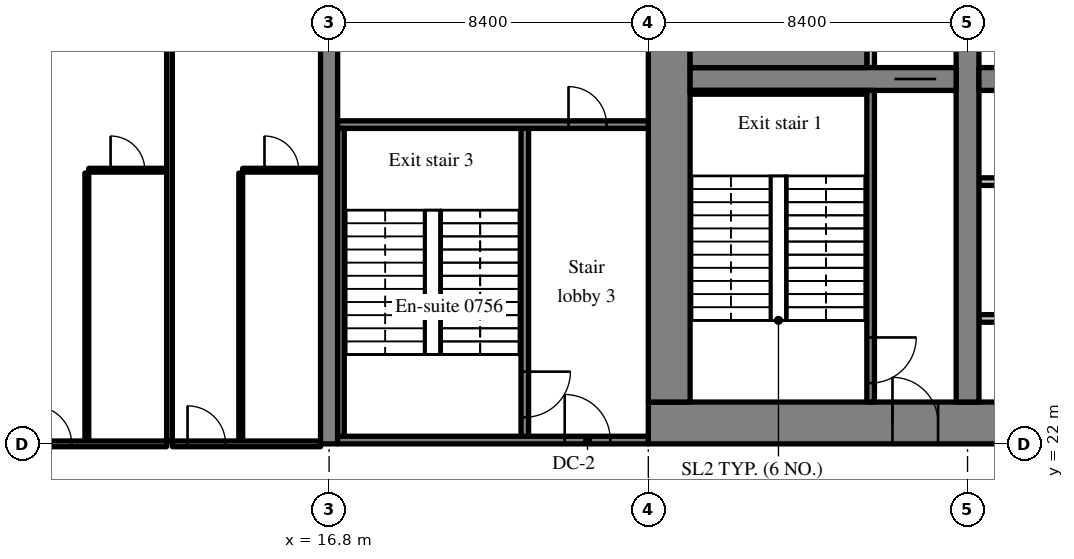
"""IFC4 building model, lengths in metres.
Left out: names, types, materials, properties, quantities, classifications, styles, units other than length and angle.
Written with IfcOpenShell. Run it as: python <this file> out.ifc"""

import sys

from ifc_helpers import new_model, si_unit, direction, frame, frame_2d, origin, place, context, subcontext, project, spatial, rectangle, extrude, source, transform, mapped, element, fill, save


model = new_model("IFC4")
c1 = context("Model", 3, precision=1e-05, world=origin(), true_north=direction((0.0, 1.0)))
c2 = subcontext(c1, "Body", "Model", "MODEL_VIEW")
j1 = project(units=[si_unit("LENGTHUNIT", "METRE"), si_unit("PLANEANGLEUNIT", "RADIAN")], contexts=[c1])
p1 = place(None, origin())
s1 = spatial("IfcSite", under=j1, at=p1, CompositionType="ELEMENT")
p2 = place(p1, origin())
s2 = spatial("IfcBuilding", under=s1, at=p2, CompositionType="ELEMENT")
p3 = place(p2, frame((0.0, 0.0, 35.4)))
s3 = spatial("IfcBuildingStorey", under=s2, at=p3, CompositionType="ELEMENT", Elevation=35.4)
m1 = source(origin(), c2, "Body", "SweptSolid", [
    extrude(rectangle(XDim=50.4, YDim=1.1, at=frame_2d((25.2, 0.0))), origin(), (0.0, 0.0, 1.0), 3.52),
])
p4 = place(p3, frame((25.2, 22.55, 0.0), z_axis=(0.0, 0.0, 1.0), x_axis=(1.0, 0.0, 0.0)))
e1 = element("IfcWall", 1, at=p4, inside=s3, PredefinedType="SHEAR", context=c2, shape_type="MappedRepresentation", body=[
    mapped(m1, transform((0.0, 0.0, 0.0), scale=1.0)),
])
m2 = source(origin(), c2, "Body", "SweptSolid", [
    extrude(rectangle(XDim=1.8, YDim=2.1, at=frame_2d((0.9, 1.05))), frame((0.0, 0.56, 0.0), z_axis=(0.0, -1.0, 0.0), x_axis=(1.0, 0.0, 0.0)), (0.0, 0.0, 1.0), 1.12),
])
p5 = place(p4, frame((15.9, 0.0, 0.0)))
e2 = element("IfcOpeningElement", 2, at=p5, cuts=e1, PredefinedType="OPENING", context=c2, shape_type="MappedRepresentation", body=[
    mapped(m2, transform((0.0, 0.0, 0.0), scale=1.0)),
])
m3 = source(origin(), c2, "Body", "SweptSolid", [
    extrude(rectangle(XDim=1.2, YDim=2.1, at=frame_2d((0.6, 1.05))), frame((0.0, 0.56, 0.0), z_axis=(0.0, -1.0, 0.0), x_axis=(1.0, 0.0, 0.0)), (0.0, 0.0, 1.0), 1.12),
])
p6 = place(p4, frame((27.0, 0.0, 0.0)))
e3 = element("IfcOpeningElement", 3, at=p6, cuts=e1, PredefinedType="OPENING", context=c2, shape_type="MappedRepresentation", body=[
    mapped(m3, transform((0.0, 0.0, 0.0), scale=1.0)),
])
m4 = source(origin(), c2, "Body", "SweptSolid", [
    extrude(rectangle(XDim=0.9, YDim=2.1, at=frame_2d((0.45, 1.05))), frame((0.0, 0.56, 0.0), z_axis=(0.0, -1.0, 0.0), x_axis=(1.0, 0.0, 0.0)), (0.0, 0.0, 1.0), 1.12),
])
p7 = place(p4, frame((33.75, 0.0, 0.0)))
e4 = element("IfcOpeningElement", 4, at=p7, cuts=e1, PredefinedType="OPENING", context=c2, shape_type="MappedRepresentation", body=[
    mapped(m4, transform((0.0, 0.0, 0.0), scale=1.0)),
])
p8 = place(p4, frame((30.75, 0.0, 0.0)))
e5 = element("IfcOpeningElement", 5, at=p8, cuts=e1, PredefinedType="OPENING", context=c2, shape_type="MappedRepresentation", body=[
    mapped(m4, transform((0.0, 0.0, 0.0), scale=1.0)),
])
p9 = place(p4, frame((39.75, 0.0, 0.0)))
e6 = element("IfcOpeningElement", 6, at=p9, cuts=e1, PredefinedType="OPENING", context=c2, shape_type="MappedRepresentation", body=[
    mapped(m4, transform((0.0, 0.0, 0.0), scale=1.0)),
])
p10 = place(p4, frame((36.75, 0.0, 0.0)))
e7 = element("IfcOpeningElement", 7, at=p10, cuts=e1, PredefinedType="OPENING", context=c2, shape_type="MappedRepresentation", body=[
    mapped(m4, transform((0.0, 0.0, 0.0), scale=1.0)),
])
p11 = place(p4, frame((6.425, 0.0, 0.0)))
e8 = element("IfcOpeningElement", 8, at=p11, cuts=e1, PredefinedType="OPENING", context=c2, shape_type="MappedRepresentation", body=[
    mapped(m3, transform((0.0, 0.0, 0.0), scale=1.0)),
])
p12 = place(p4, frame((47.675, 0.0, 0.0)))
e9 = element("IfcOpeningElement", 9, at=p12, cuts=e1, PredefinedType="OPENING", context=c2, shape_type="MappedRepresentation", body=[
    mapped(m3, transform((0.0, 0.0, 0.0), scale=1.0)),
])
m5 = source(origin(), c2, "Body", "SweptSolid", [
    extrude(rectangle(XDim=17.8, YDim=1.1, at=frame_2d((8.9, 0.0))), origin(), (0.0, 0.0, 1.0), 3.52),
])
p13 = place(p3, frame((25.75, 23.1, 0.0), z_axis=(0.0, 0.0, 1.0), x_axis=(0.0, 1.0, 0.0)))
e10 = element("IfcWall", 10, at=p13, inside=s3, PredefinedType="SHEAR", context=c2, shape_type="MappedRepresentation", body=[
    mapped(m5, transform((0.0, 0.0, 0.0), scale=1.0)),
])
m6 = source(origin(), c2, "Body", "SweptSolid", [
    extrude(rectangle(XDim=17.8, YDim=0.6, at=frame_2d((8.9, 0.0))), origin(), (0.0, 0.0, 1.0), 3.52),
])
p14 = place(p3, frame((33.6, 23.1, 0.0), z_axis=(0.0, 0.0, 1.0), x_axis=(0.0, 1.0, 0.0)))
e11 = element("IfcWall", 11, at=p14, inside=s3, PredefinedType="SHEAR", context=c2, shape_type="MappedRepresentation", body=[
    mapped(m6, transform((0.0, 0.0, 0.0), scale=1.0)),
])
m7 = source(origin(), c2, "Body", "SweptSolid", [
    extrude(rectangle(XDim=1.1, YDim=2.1, at=frame_2d((0.55, 1.05))), frame((0.0, 0.31, 0.0), z_axis=(0.0, -1.0, 0.0), x_axis=(1.0, 0.0, 0.0)), (0.0, 0.0, 1.0), 0.62),
])
p15 = place(p14, frame((12.35, 0.0, 0.0)))
e12 = element("IfcOpeningElement", 12, at=p15, cuts=e11, PredefinedType="OPENING", context=c2, shape_type="MappedRepresentation", body=[
    mapped(m7, transform((0.0, 0.0, 0.0), scale=1.0)),
])
m8 = source(origin(), c2, "Body", "SweptSolid", [
    extrude(rectangle(XDim=7.0, YDim=0.6, at=frame_2d((3.5, 0.0))), origin(), (0.0, 0.0, 1.0), 3.52),
])
p16 = place(p3, frame((26.3, 31.6, 0.0), z_axis=(0.0, 0.0, 1.0), x_axis=(1.0, 0.0, 0.0)))
e13 = element("IfcWall", 13, at=p16, inside=s3, PredefinedType="SHEAR", context=c2, shape_type="MappedRepresentation", body=[
    mapped(m8, transform((0.0, 0.0, 0.0), scale=1.0)),
])
p17 = place(p16, frame((5.375, 0.0, 0.0)))
e14 = element("IfcOpeningElement", 14, at=p17, cuts=e13, PredefinedType="OPENING", context=c2, shape_type="MappedRepresentation", body=[
    mapped(m7, transform((0.0, 0.0, 0.0), scale=1.0)),
])
m9 = source(origin(), c2, "Body", "SweptSolid", [
    extrude(rectangle(XDim=16.2, YDim=0.6, at=frame_2d((8.1, 0.0))), origin(), (0.0, 0.0, 1.0), 3.52),
])
p18 = place(p3, frame((33.9, 31.6, 0.0), z_axis=(0.0, 0.0, 1.0), x_axis=(1.0, 0.0, 0.0)))
e15 = element("IfcWall", 15, at=p18, inside=s3, PredefinedType="SHEAR", context=c2, shape_type="MappedRepresentation", body=[
    mapped(m9, transform((0.0, 0.0, 0.0), scale=1.0)),
])
m10 = source(origin(), c2, "Body", "SweptSolid", [
    extrude(rectangle(XDim=1.0, YDim=2.1, at=frame_2d((0.5, 1.05))), frame((0.0, 0.31, 0.0), z_axis=(0.0, -1.0, 0.0), x_axis=(1.0, 0.0, 0.0)), (0.0, 0.0, 1.0), 0.62),
])
p19 = place(p18, frame((14.65, 0.0, 0.0)))
e16 = element("IfcOpeningElement", 16, at=p19, cuts=e15, PredefinedType="OPENING", context=c2, shape_type="MappedRepresentation", body=[
    mapped(m10, transform((0.0, 0.0, 0.0), scale=1.0)),
])
m11 = source(origin(), c2, "Body", "SweptSolid", [
    extrude(rectangle(XDim=20.0, YDim=0.45, at=frame_2d((10.0, 0.0))), origin(), (0.0, 0.0, 1.0), 3.52),
])
p20 = place(p3, frame((16.8, 22.0, 0.0), z_axis=(0.0, 0.0, 1.0), x_axis=(0.0, 1.0, 0.0)))
e17 = element("IfcWall", 17, at=p20, inside=s3, PredefinedType="SHEAR", context=c2, shape_type="MappedRepresentation", body=[
    mapped(m11, transform((0.0, 0.0, 0.0), scale=1.0)),
])
m12 = source(origin(), c2, "Body", "SweptSolid", [
    extrude(rectangle(XDim=6.0, YDim=0.2, at=frame_2d((3.0, 0.0))), origin(), (0.0, 0.0, 1.0), 3.52),
])
p21 = place(p3, frame((33.9, 25.3, 0.0), z_axis=(0.0, 0.0, 1.0), x_axis=(1.0, 0.0, 0.0)))
e18 = element("IfcWall", 18, at=p21, inside=s3, PredefinedType="SOLIDWALL", context=c2, shape_type="MappedRepresentation", body=[
    mapped(m12, transform((0.0, 0.0, 0.0), scale=1.0)),
])
m13 = source(origin(), c2, "Body", "SweptSolid", [
    extrude(rectangle(XDim=1.1, YDim=2.1, at=frame_2d((0.55, 1.05))), frame((0.0, 0.11, 0.0), z_axis=(0.0, -1.0, 0.0), x_axis=(1.0, 0.0, 0.0)), (0.0, 0.0, 1.0), 0.22),
])
p22 = place(p21, frame((0.95, 0.0, 0.0)))
e19 = element("IfcOpeningElement", 19, at=p22, cuts=e18, PredefinedType="OPENING", context=c2, shape_type="MappedRepresentation", body=[
    mapped(m13, transform((0.0, 0.0, 0.0), scale=1.0)),
])
p23 = place(p21, frame((3.95, 0.0, 0.0)))
e20 = element("IfcOpeningElement", 20, at=p23, cuts=e18, PredefinedType="OPENING", context=c2, shape_type="MappedRepresentation", body=[
    mapped(m13, transform((0.0, 0.0, 0.0), scale=1.0)),
])
m14 = source(origin(), c2, "Body", "SweptSolid", [
    extrude(rectangle(XDim=12.0, YDim=0.2, at=frame_2d((6.0, 0.0))), origin(), (0.0, 0.0, 1.0), 3.52),
])
p24 = place(p3, frame((33.9, 28.9, 0.0), z_axis=(0.0, 0.0, 1.0), x_axis=(1.0, 0.0, 0.0)))
e21 = element("IfcWall", 21, at=p24, inside=s3, PredefinedType="SOLIDWALL", context=c2, shape_type="MappedRepresentation", body=[
    mapped(m14, transform((0.0, 0.0, 0.0), scale=1.0)),
])
p25 = place(p24, frame((0.95, 0.0, 0.0)))
e22 = element("IfcOpeningElement", 22, at=p25, cuts=e21, PredefinedType="OPENING", context=c2, shape_type="MappedRepresentation", body=[
    mapped(m13, transform((0.0, 0.0, 0.0), scale=1.0)),
])
p26 = place(p24, frame((3.95, 0.0, 0.0)))
e23 = element("IfcOpeningElement", 23, at=p26, cuts=e21, PredefinedType="OPENING", context=c2, shape_type="MappedRepresentation", body=[
    mapped(m13, transform((0.0, 0.0, 0.0), scale=1.0)),
])
p27 = place(p24, frame((6.95, 0.0, 0.0)))
e24 = element("IfcOpeningElement", 24, at=p27, cuts=e21, PredefinedType="OPENING", context=c2, shape_type="MappedRepresentation", body=[
    mapped(m13, transform((0.0, 0.0, 0.0), scale=1.0)),
])
p28 = place(p24, frame((9.95, 0.0, 0.0)))
e25 = element("IfcOpeningElement", 25, at=p28, cuts=e21, PredefinedType="OPENING", context=c2, shape_type="MappedRepresentation", body=[
    mapped(m13, transform((0.0, 0.0, 0.0), scale=1.0)),
])
m15 = source(origin(), c2, "Body", "SweptSolid", [
    extrude(rectangle(XDim=8.2, YDim=0.2, at=frame_2d((4.1, 0.0))), origin(), (0.0, 0.0, 1.0), 3.52),
])
p29 = place(p3, frame((31.05, 23.1, 0.0), z_axis=(0.0, 0.0, 1.0), x_axis=(0.0, 1.0, 0.0)))
e26 = element("IfcWall", 26, at=p29, inside=s3, PredefinedType="SOLIDWALL", context=c2, shape_type="MappedRepresentation", body=[
    mapped(m15, transform((0.0, 0.0, 0.0), scale=1.0)),
])
m16 = source(origin(), c2, "Body", "SweptSolid", [
    extrude(rectangle(XDim=1.2, YDim=2.1, at=frame_2d((0.6, 1.05))), frame((0.0, 0.11, 0.0), z_axis=(0.0, -1.0, 0.0), x_axis=(1.0, 0.0, 0.0)), (0.0, 0.0, 1.0), 0.22),
])
p30 = place(p29, frame((0.5, 0.0, 0.0)))
e27 = element("IfcOpeningElement", 27, at=p30, cuts=e26, PredefinedType="OPENING", context=c2, shape_type="MappedRepresentation", body=[
    mapped(m16, transform((0.0, 0.0, 0.0), scale=1.0)),
])
m17 = source(origin(), c2, "Body", "SweptSolid", [
    extrude(rectangle(XDim=1.7, YDim=0.2, at=frame_2d((0.85, 0.0))), origin(), (0.0, 0.0, 1.0), 3.52),
])
p31 = place(p3, frame((31.05, 31.9, 0.0), z_axis=(0.0, 0.0, 1.0), x_axis=(0.0, 1.0, 0.0)))
e28 = element("IfcWall", 28, at=p31, inside=s3, PredefinedType="SOLIDWALL", context=c2, shape_type="MappedRepresentation", body=[
    mapped(m17, transform((0.0, 0.0, 0.0), scale=1.0)),
])
m18 = source(origin(), c2, "Body", "SweptSolid", [
    extrude(rectangle(XDim=8.3, YDim=0.2, at=frame_2d((4.15, 0.0))), origin(), (0.0, 0.0, 1.0), 3.52),
])
p32 = place(p3, frame((21.95, 22.1, 0.0), z_axis=(0.0, 0.0, 1.0), x_axis=(0.0, 1.0, 0.0)))
e29 = element("IfcWall", 29, at=p32, inside=s3, PredefinedType="SOLIDWALL", context=c2, shape_type="MappedRepresentation", body=[
    mapped(m18, transform((0.0, 0.0, 0.0), scale=1.0)),
])
p33 = place(p32, frame((0.6, 0.0, 0.0)))
e30 = element("IfcOpeningElement", 30, at=p33, cuts=e29, PredefinedType="OPENING", context=c2, shape_type="MappedRepresentation", body=[
    mapped(m16, transform((0.0, 0.0, 0.0), scale=1.0)),
])
m19 = source(origin(), c2, "Body", "SweptSolid", [
    extrude(rectangle(XDim=8.175, YDim=0.2, at=frame_2d((4.087, 0.0))), origin(), (0.0, 0.0, 1.0), 3.52),
])
p34 = place(p3, frame((17.025, 22.1, 0.0), z_axis=(0.0, 0.0, 1.0), x_axis=(1.0, 0.0, 0.0)))
e31 = element("IfcWall", 31, at=p34, inside=s3, PredefinedType="SOLIDWALL", context=c2, shape_type="MappedRepresentation", body=[
    mapped(m19, transform((0.0, 0.0, 0.0), scale=1.0)),
])
p35 = place(p34, frame((5.975, 0.0, 0.0)))
e32 = element("IfcOpeningElement", 32, at=p35, cuts=e31, PredefinedType="OPENING", context=c2, shape_type="MappedRepresentation", body=[
    mapped(m16, transform((0.0, 0.0, 0.0), scale=1.0)),
])
p36 = place(p3, frame((17.025, 30.4, 0.0), z_axis=(0.0, 0.0, 1.0), x_axis=(1.0, 0.0, 0.0)))
e33 = element("IfcWall", 33, at=p36, inside=s3, PredefinedType="SOLIDWALL", context=c2, shape_type="MappedRepresentation", body=[
    mapped(m19, transform((0.0, 0.0, 0.0), scale=1.0)),
])
m20 = source(origin(), c2, "Body", "SweptSolid", [
    extrude(rectangle(XDim=1.0, YDim=2.1, at=frame_2d((0.5, 1.05))), frame((0.0, 0.11, 0.0), z_axis=(0.0, -1.0, 0.0), x_axis=(1.0, 0.0, 0.0)), (0.0, 0.0, 1.0), 0.22),
])
p37 = place(p36, frame((6.075, 0.0, 0.0)))
e34 = element("IfcOpeningElement", 34, at=p37, cuts=e33, PredefinedType="OPENING", context=c2, shape_type="MappedRepresentation", body=[
    mapped(m20, transform((0.0, 0.0, 0.0), scale=1.0)),
])
m21 = source(origin(), c2, "Body", "SweptSolid", [
    extrude(rectangle(XDim=4.65, YDim=0.1, at=frame_2d((2.325, 0.0))), origin(), (0.0, 0.0, 1.0), 3.52),
])
p38 = place(p3, frame((26.3, 31.25, 0.0), z_axis=(0.0, 0.0, 1.0), x_axis=(1.0, 0.0, 0.0)))
e35 = element("IfcWall", 35, at=p38, inside=s3, PredefinedType="SOLIDWALL", context=c2, shape_type="MappedRepresentation", body=[
    mapped(m21, transform((0.0, 0.0, 0.0), scale=1.0)),
])
m22 = source(origin(), c2, "Body", "SweptSolid", [
    extrude(rectangle(XDim=8.1, YDim=0.175, at=frame_2d((4.05, 0.0))), origin(), (0.0, 0.0, 1.0), 3.52),
])
p39 = place(p3, frame((17.112, 22.2, 0.0), z_axis=(0.0, 0.0, 1.0), x_axis=(0.0, 1.0, 0.0)))
e36 = element("IfcWall", 36, at=p39, inside=s3, PredefinedType="SOLIDWALL", context=c2, shape_type="MappedRepresentation", body=[
    mapped(m22, transform((0.0, 0.0, 0.0), scale=1.0)),
])
m23 = source(origin(), c2, "Body", "SweptSolid", [
    extrude(rectangle(XDim=4.65, YDim=0.9, at=frame_2d((2.325, 0.0))), origin(), (0.0, 0.0, 1.0), 3.52),
])
p40 = place(p3, frame((26.3, 32.35, 0.0), z_axis=(0.0, 0.0, 1.0), x_axis=(1.0, 0.0, 0.0)))
e37 = element("IfcWall", 37, at=p40, inside=s3, PredefinedType="SOLIDWALL", context=c2, shape_type="MappedRepresentation", body=[
    mapped(m23, transform((0.0, 0.0, 0.0), scale=1.0)),
])
m24 = source(origin(), c2, "Body", "SweptSolid", [
    extrude(rectangle(XDim=7.05, YDim=0.1, at=frame_2d((3.525, 0.0))), origin(), (0.0, 0.0, 1.0), 3.52),
])
p41 = place(p3, frame((10.425, 22.075, 0.0), z_axis=(0.0, 0.0, 1.0), x_axis=(0.0, 1.0, 0.0)))
e38 = element("IfcWall", 38, at=p41, inside=s3, PredefinedType="PARTITIONING", context=c2, shape_type="MappedRepresentation", body=[
    mapped(m24, transform((0.0, 0.0, 0.0), scale=1.0)),
])
m25 = source(origin(), c2, "Body", "SweptSolid", [
    extrude(rectangle(XDim=2.05, YDim=0.1, at=frame_2d((1.025, 0.0))), origin(), (0.0, 0.0, 1.0), 3.52),
])
p42 = place(p3, frame((10.475, 29.2, 0.0), z_axis=(0.0, 0.0, 1.0), x_axis=(1.0, 0.0, 0.0)))
e39 = element("IfcWall", 39, at=p42, inside=s3, PredefinedType="PARTITIONING", context=c2, shape_type="MappedRepresentation", body=[
    mapped(m25, transform((0.0, 0.0, 0.0), scale=1.0)),
])
m26 = source(origin(), c2, "Body", "SweptSolid", [
    extrude(rectangle(XDim=0.9, YDim=2.1, at=frame_2d((0.45, 1.05))), frame((0.0, 0.06, 0.0), z_axis=(0.0, -1.0, 0.0), x_axis=(1.0, 0.0, 0.0)), (0.0, 0.0, 1.0), 0.12),
])
p43 = place(p42, frame((0.575, 0.0, 0.0)))
e40 = element("IfcOpeningElement", 40, at=p43, cuts=e39, PredefinedType="OPENING", context=c2, shape_type="MappedRepresentation", body=[
    mapped(m26, transform((0.0, 0.0, 0.0), scale=1.0)),
])
m27 = source(origin(), c2, "Body", "SweptSolid", [
    extrude(rectangle(XDim=3.9, YDim=0.15, at=frame_2d((1.95, 0.0))), origin(), (0.0, 0.0, 1.0), 2.82),
])
p44 = place(p3, frame((8.625, 22.0, 0.0), z_axis=(0.0, 0.0, 1.0), x_axis=(1.0, 0.0, 0.0)))
e41 = element("IfcWall", 41, at=p44, inside=s3, PredefinedType="PARTITIONING", context=c2, shape_type="MappedRepresentation", body=[
    mapped(m27, transform((0.0, 0.0, 0.0), scale=1.0)),
])
m28 = source(origin(), c2, "Body", "SweptSolid", [
    extrude(rectangle(XDim=1.0, YDim=2.1, at=frame_2d((0.5, 1.05))), frame((0.0, 0.085, 0.0), z_axis=(0.0, -1.0, 0.0), x_axis=(1.0, 0.0, 0.0)), (0.0, 0.0, 1.0), 0.17),
])
p45 = place(p44, frame((0.4, 0.0, 0.0)))
e42 = element("IfcOpeningElement", 42, at=p45, cuts=e41, PredefinedType="OPENING", context=c2, shape_type="MappedRepresentation", body=[
    mapped(m28, transform((0.0, 0.0, 0.0), scale=1.0)),
])
p46 = place(p3, frame((14.475, 22.075, 0.0), z_axis=(0.0, 0.0, 1.0), x_axis=(0.0, 1.0, 0.0)))
e43 = element("IfcWall", 43, at=p46, inside=s3, PredefinedType="PARTITIONING", context=c2, shape_type="MappedRepresentation", body=[
    mapped(m24, transform((0.0, 0.0, 0.0), scale=1.0)),
])
m29 = source(origin(), c2, "Body", "SweptSolid", [
    extrude(rectangle(XDim=2.05, YDim=0.1, at=frame_2d((1.025, 0.0))), origin(), (0.0, 0.0, 1.0), 3.52),
])
p47 = place(p3, frame((14.525, 29.2, 0.0), z_axis=(0.0, 0.0, 1.0), x_axis=(1.0, 0.0, 0.0)))
e44 = element("IfcWall", 44, at=p47, inside=s3, PredefinedType="PARTITIONING", context=c2, shape_type="MappedRepresentation", body=[
    mapped(m29, transform((0.0, 0.0, 0.0), scale=1.0)),
])
p48 = place(p47, frame((0.575, 0.0, 0.0)))
e45 = element("IfcOpeningElement", 45, at=p48, cuts=e44, PredefinedType="OPENING", context=c2, shape_type="MappedRepresentation", body=[
    mapped(m26, transform((0.0, 0.0, 0.0), scale=1.0)),
])
p49 = place(p3, frame((12.675, 22.0, 0.0), z_axis=(0.0, 0.0, 1.0), x_axis=(1.0, 0.0, 0.0)))
e46 = element("IfcWall", 46, at=p49, inside=s3, PredefinedType="PARTITIONING", context=c2, shape_type="MappedRepresentation", body=[
    mapped(m27, transform((0.0, 0.0, 0.0), scale=1.0)),
])
p50 = place(p49, frame((0.4, 0.0, 0.0)))
e47 = element("IfcOpeningElement", 47, at=p50, cuts=e46, PredefinedType="OPENING", context=c2, shape_type="MappedRepresentation", body=[
    mapped(m28, transform((0.0, 0.0, 0.0), scale=1.0)),
])
m30 = source(origin(), c2, "Body", "SweptSolid", [
    extrude(rectangle(XDim=19.025, YDim=0.15, at=frame_2d((9.513, 0.0))), origin(), (0.0, 0.0, 1.0), 3.52),
])
p51 = place(p3, frame((12.6, 22.075, 0.0), z_axis=(0.0, 0.0, 1.0), x_axis=(0.0, 1.0, 0.0)))
e48 = element("IfcWall", 48, at=p51, inside=s3, PredefinedType="PARTITIONING", context=c2, shape_type="MappedRepresentation", body=[
    mapped(m30, transform((0.0, 0.0, 0.0), scale=1.0)),
])
m31 = source(origin(), c2, "Body", "SweptSolid", [
    extrude(rectangle(XDim=1.2, YDim=2.1, at=frame_2d((0.6, 1.05))), frame((0.0, 0.025, 0.0), z_axis=(0.0, -1.0, 0.0), x_axis=(1.0, 0.0, 0.0)), (0.0, 0.0, 1.0), 0.05),
])
p52 = place(p30, origin())
e49 = element("IfcDoor", 49, at=p52, inside=s3, OperationType="SINGLE_SWING_RIGHT", PredefinedType="DOOR", context=c2, shape_type="MappedRepresentation", body=[
    mapped(m31, transform((0.0, 0.0, 0.0), scale=1.0)),
])
fill(e27, e49)
m32 = source(origin(), c2, "Body", "SweptSolid", [
    extrude(rectangle(XDim=1.2, YDim=2.1, at=frame_2d((0.6, 1.05))), frame((0.0, 0.325, 0.0), z_axis=(0.0, -1.0, 0.0), x_axis=(1.0, 0.0, 0.0)), (0.0, 0.0, 1.0), 0.05),
])
p53 = place(p11, origin())
e50 = element("IfcDoor", 50, at=p53, inside=s3, OperationType="SINGLE_SWING_LEFT", PredefinedType="DOOR", context=c2, shape_type="MappedRepresentation", body=[
    mapped(m32, transform((0.0, 0.0, 0.0), scale=1.0)),
])
fill(e8, e50)
m33 = source(origin(), c2, "Body", "SweptSolid", [
    extrude(rectangle(XDim=1.1, YDim=2.1, at=frame_2d((0.55, 1.05))), frame((0.0, 0.025, 0.0), z_axis=(0.0, -1.0, 0.0), x_axis=(1.0, 0.0, 0.0)), (0.0, 0.0, 1.0), 0.05),
])
p54 = place(p17, origin())
e51 = element("IfcDoor", 51, at=p54, inside=s3, OperationType="SLIDING_TO_RIGHT", PredefinedType="DOOR", context=c2, shape_type="MappedRepresentation", body=[
    mapped(m33, transform((0.0, 0.0, 0.0), scale=1.0)),
])
fill(e14, e51)
p55 = place(p33, origin())
e52 = element("IfcDoor", 52, at=p55, inside=s3, OperationType="SINGLE_SWING_RIGHT", PredefinedType="DOOR", context=c2, shape_type="MappedRepresentation", body=[
    mapped(m31, transform((0.0, 0.0, 0.0), scale=1.0)),
])
fill(e30, e52)
p56 = place(p35, origin())
e53 = element("IfcDoor", 53, at=p56, inside=s3, OperationType="SINGLE_SWING_LEFT", PredefinedType="DOOR", context=c2, shape_type="MappedRepresentation", body=[
    mapped(m31, transform((0.0, 0.0, 0.0), scale=1.0)),
])
fill(e32, e53)
m34 = source(origin(), c2, "Body", "SweptSolid", [
    extrude(rectangle(XDim=1.0, YDim=2.1, at=frame_2d((0.5, 1.05))), frame((0.0, 0.025, 0.0), z_axis=(0.0, -1.0, 0.0), x_axis=(1.0, 0.0, 0.0)), (0.0, 0.0, 1.0), 0.05),
])
p57 = place(p37, origin())
e54 = element("IfcDoor", 54, at=p57, inside=s3, OperationType="SINGLE_SWING_LEFT", PredefinedType="DOOR", context=c2, shape_type="MappedRepresentation", body=[
    mapped(m34, transform((0.0, 0.0, 0.0), scale=1.0)),
])
fill(e34, e54)
m35 = source(origin(), c2, "Body", "SweptSolid", [
    extrude(rectangle(XDim=0.9, YDim=2.1, at=frame_2d((0.45, 1.05))), frame((0.0, 0.025, 0.0), z_axis=(0.0, -1.0, 0.0), x_axis=(1.0, 0.0, 0.0)), (0.0, 0.0, 1.0), 0.05),
])
p58 = place(p43, origin())
e55 = element("IfcDoor", 55, at=p58, inside=s3, OperationType="SINGLE_SWING_LEFT", PredefinedType="DOOR", context=c2, shape_type="MappedRepresentation", body=[
    mapped(m35, transform((0.0, 0.0, 0.0), scale=1.0)),
])
fill(e40, e55)
p59 = place(p45, origin())
e56 = element("IfcDoor", 56, at=p59, inside=s3, OperationType="SINGLE_SWING_LEFT", PredefinedType="DOOR", context=c2, shape_type="MappedRepresentation", body=[
    mapped(m34, transform((0.0, 0.0, 0.0), scale=1.0)),
])
fill(e42, e56)
p60 = place(p48, origin())
e57 = element("IfcDoor", 57, at=p60, inside=s3, OperationType="SINGLE_SWING_LEFT", PredefinedType="DOOR", context=c2, shape_type="MappedRepresentation", body=[
    mapped(m35, transform((0.0, 0.0, 0.0), scale=1.0)),
])
fill(e45, e57)
p61 = place(p50, origin())
e58 = element("IfcDoor", 58, at=p61, inside=s3, OperationType="SINGLE_SWING_LEFT", PredefinedType="DOOR", context=c2, shape_type="MappedRepresentation", body=[
    mapped(m34, transform((0.0, 0.0, 0.0), scale=1.0)),
])
fill(e47, e58)
save(model, sys.argv[1])
